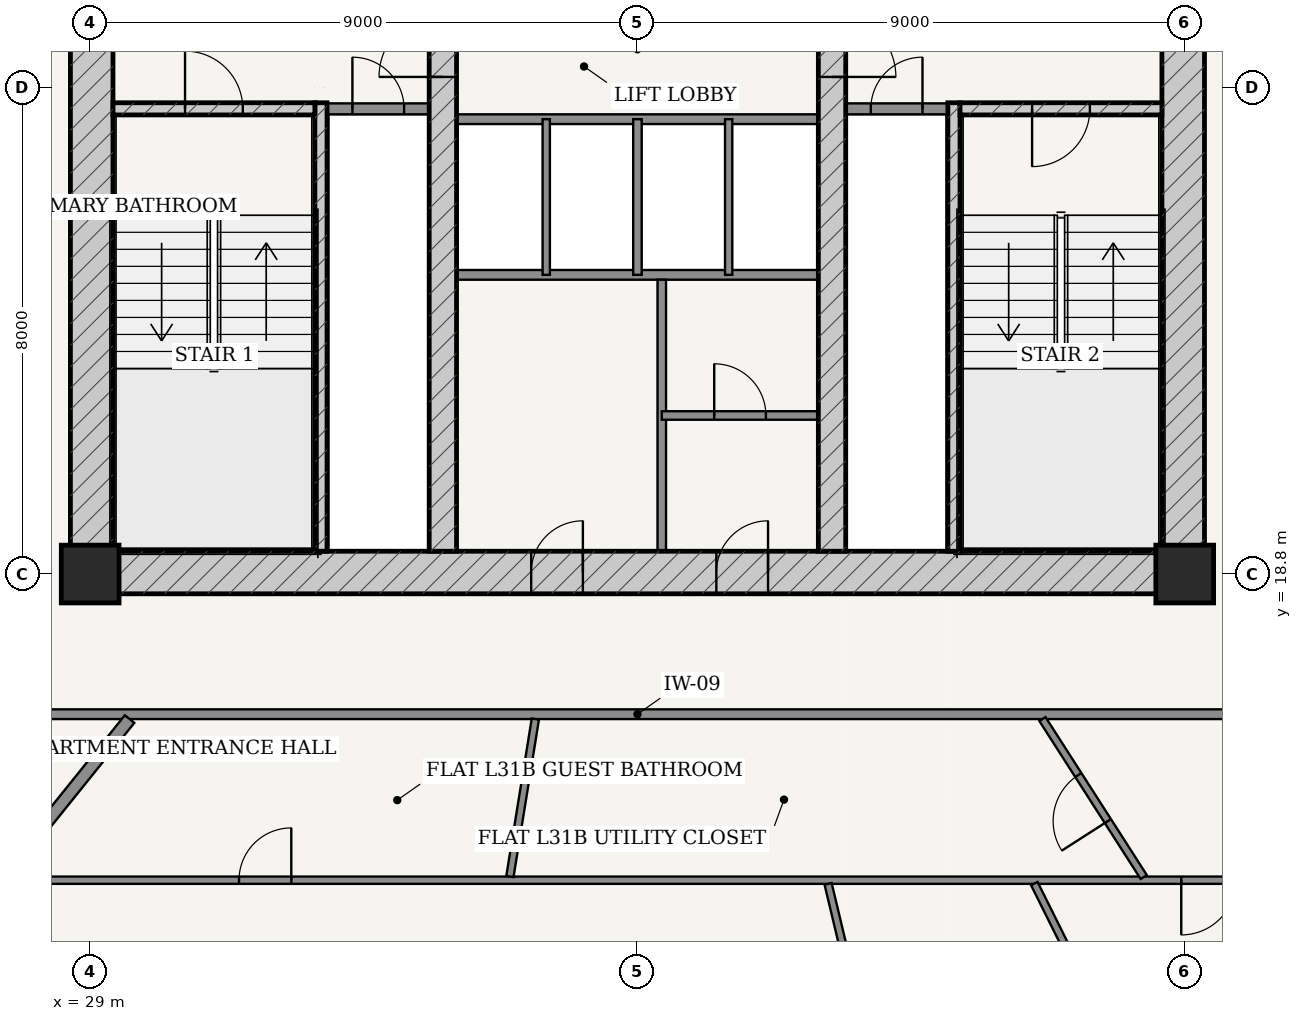
"""IFC4 building model, lengths in metres.
Left out: names, types, materials, properties, quantities, classifications, styles, units other than length and angle.
Written with IfcOpenShell. Run it as: python <this file> out.ifc"""

import sys

from ifc_helpers import new_model, si_unit, direction, frame, frame_2d, origin, origin_2d, place, context, subcontext, project, spatial, rectangle, extrude, source, transform, mapped, element, fill, save


model = new_model("IFC4")
c1 = context("Model", 3, precision=1e-05, world=origin(), true_north=direction((-0.2419218956, 0.970295726276)))
c2 = subcontext(c1, "Body", "Model", "MODEL_VIEW")
j1 = project(units=[si_unit("LENGTHUNIT", "METRE"), si_unit("PLANEANGLEUNIT", "RADIAN")], contexts=[c1])
p1 = place(None, origin())
s1 = spatial("IfcSite", under=j1, at=p1, CompositionType="ELEMENT")
p2 = place(p1, origin())
s2 = spatial("IfcBuilding", under=s1, at=p2, CompositionType="ELEMENT")
p3 = place(p2, frame((0.0, 0.0, 119.4)))
s3 = spatial("IfcBuildingStorey", under=s2, at=p3, CompositionType="ELEMENT", Elevation=119.4)
for number, where, z_axis, x_axis in (
    (1, (29.0, 18.8, 0.0), (0.0, 0.0, 1.0), (1.0, 0.0, 0.0)),
    (2, (47.0, 18.8, 0.0), (0.0, 0.0, 1.0), (1.0, 0.0, 0.0)),
):
    element("IfcColumn", number, at=place(p3, frame(where, z_axis=z_axis, x_axis=x_axis)), inside=s3, PredefinedType="COLUMN", context=c2, shape_type="SweptSolid", body=[
        extrude(rectangle(XDim=0.95, YDim=0.95, at=origin_2d()), origin(), (0.0, 0.0, 1.0), 3.6),
    ])
p4 = place(p3, frame((28.675, 18.825, 0.0), z_axis=(0.0, 0.0, 1.0), x_axis=(1.0, 0.0, 0.0)))
e3 = element("IfcWall", 3, at=p4, inside=s3, PredefinedType="SHEAR", context=c2, shape_type="SweptSolid", body=[
    extrude(rectangle(XDim=18.65, YDim=0.7, at=frame_2d((9.325, 0.0))), origin(), (0.0, 0.0, 1.0), 3.325),
])
p5 = place(p4, frame((7.577, 0.0, 0.0)))
e4 = element("IfcOpeningElement", 4, at=p5, cuts=e3, PredefinedType="OPENING", context=c2, shape_type="SweptSolid", body=[
    extrude(rectangle(XDim=0.85, YDim=2.1, at=frame_2d((0.425, 1.05))), frame((0.0, 0.36, 0.0), z_axis=(0.0, -1.0, 0.0), x_axis=(1.0, 0.0, 0.0)), (0.0, 0.0, 1.0), 0.72),
])
p6 = place(p4, frame((10.623, 0.0, 0.0)))
e5 = element("IfcOpeningElement", 5, at=p6, cuts=e3, PredefinedType="OPENING", context=c2, shape_type="SweptSolid", body=[
    extrude(rectangle(XDim=0.85, YDim=2.1, at=frame_2d((0.425, 1.05))), frame((0.0, 0.36, 0.0), z_axis=(0.0, -1.0, 0.0), x_axis=(1.0, 0.0, 0.0)), (0.0, 0.0, 1.0), 0.72),
])
p7 = place(p3, frame((29.025, 19.175, 0.0), z_axis=(0.0, 0.0, 1.0), x_axis=(0.0, 1.0, 0.0)))
e6 = element("IfcWall", 6, at=p7, inside=s3, PredefinedType="SHEAR", context=c2, shape_type="SweptSolid", body=[
    extrude(rectangle(XDim=15.25, YDim=0.7, at=frame_2d((7.625, 0.0))), origin(), (0.0, 0.0, 1.0), 3.325),
])
p8 = place(p7, frame((9.875, 0.0, 0.0)))
e7 = element("IfcOpeningElement", 7, at=p8, cuts=e6, PredefinedType="OPENING", context=c2, shape_type="SweptSolid", body=[
    extrude(rectangle(XDim=1.5, YDim=2.2, at=frame_2d((0.75, 1.1))), frame((0.0, 0.36, 0.0), z_axis=(0.0, -1.0, 0.0), x_axis=(1.0, 0.0, 0.0)), (0.0, 0.0, 1.0), 0.72),
])
p9 = place(p3, frame((46.975, 19.175, 0.0), z_axis=(0.0, 0.0, 1.0), x_axis=(0.0, 1.0, 0.0)))
e8 = element("IfcWall", 8, at=p9, inside=s3, PredefinedType="SHEAR", context=c2, shape_type="SweptSolid", body=[
    extrude(rectangle(XDim=15.25, YDim=0.7, at=frame_2d((7.625, 0.0))), origin(), (0.0, 0.0, 1.0), 3.325),
])
p10 = place(p9, frame((9.875, 0.0, 0.0)))
e9 = element("IfcOpeningElement", 9, at=p10, cuts=e8, PredefinedType="OPENING", context=c2, shape_type="SweptSolid", body=[
    extrude(rectangle(XDim=1.5, YDim=2.2, at=frame_2d((0.75, 1.1))), frame((0.0, 0.36, 0.0), z_axis=(0.0, -1.0, 0.0), x_axis=(1.0, 0.0, 0.0)), (0.0, 0.0, 1.0), 0.72),
])
p11 = place(p3, frame((32.795, 19.175, 0.0), z_axis=(0.0, 0.0, 1.0), x_axis=(0.0, 1.0, 0.0)))
e10 = element("IfcWall", 10, at=p11, inside=s3, PredefinedType="SOLIDWALL", context=c2, shape_type="SweptSolid", body=[
    extrude(rectangle(XDim=7.375, YDim=0.2, at=frame_2d((3.688, 0.0))), origin(), (0.0, 0.0, 1.0), 3.325),
])
p12 = place(p3, frame((29.375, 26.45, 0.0), z_axis=(0.0, 0.0, 1.0), x_axis=(1.0, 0.0, 0.0)))
e11 = element("IfcWall", 11, at=p12, inside=s3, PredefinedType="SOLIDWALL", context=c2, shape_type="SweptSolid", body=[
    extrude(rectangle(XDim=3.32, YDim=0.2, at=frame_2d((1.66, 0.0))), origin(), (0.0, 0.0, 1.0), 3.325),
])
p13 = place(p12, frame((1.185, 0.0, 0.0)))
e12 = element("IfcOpeningElement", 12, at=p13, cuts=e11, PredefinedType="OPENING", context=c2, shape_type="SweptSolid", body=[
    extrude(rectangle(XDim=0.95, YDim=2.15, at=frame_2d((0.475, 1.075))), frame((0.0, 0.11, 0.0), z_axis=(0.0, -1.0, 0.0), x_axis=(1.0, 0.0, 0.0)), (0.0, 0.0, 1.0), 0.22),
])
p14 = place(p3, frame((43.205, 19.175, 0.0), z_axis=(0.0, 0.0, 1.0), x_axis=(0.0, 1.0, 0.0)))
e13 = element("IfcWall", 13, at=p14, inside=s3, PredefinedType="SOLIDWALL", context=c2, shape_type="SweptSolid", body=[
    extrude(rectangle(XDim=7.375, YDim=0.2, at=frame_2d((3.688, 0.0))), origin(), (0.0, 0.0, 1.0), 3.325),
])
p15 = place(p3, frame((43.305, 26.45, 0.0), z_axis=(0.0, 0.0, 1.0), x_axis=(1.0, 0.0, 0.0)))
e14 = element("IfcWall", 14, at=p15, inside=s3, PredefinedType="SOLIDWALL", context=c2, shape_type="SweptSolid", body=[
    extrude(rectangle(XDim=3.32, YDim=0.2, at=frame_2d((1.66, 0.0))), origin(), (0.0, 0.0, 1.0), 3.325),
])
p16 = place(p15, frame((1.185, 0.0, 0.0)))
e15 = element("IfcOpeningElement", 15, at=p16, cuts=e14, PredefinedType="OPENING", context=c2, shape_type="SweptSolid", body=[
    extrude(rectangle(XDim=0.95, YDim=2.15, at=frame_2d((0.475, 1.075))), frame((0.0, 0.11, 0.0), z_axis=(0.0, -1.0, 0.0), x_axis=(1.0, 0.0, 0.0)), (0.0, 0.0, 1.0), 0.22),
])
p17 = place(p3, frame((34.8, 19.175, 0.0), z_axis=(0.0, 0.0, 1.0), x_axis=(0.0, 1.0, 0.0)))
e16 = element("IfcWall", 16, at=p17, inside=s3, PredefinedType="SHEAR", context=c2, shape_type="SweptSolid", body=[
    extrude(rectangle(XDim=15.25, YDim=0.45, at=frame_2d((7.625, 0.0))), origin(), (0.0, 0.0, 1.0), 3.325),
])
p18 = place(p17, frame((7.8, 0.0, 0.0)))
e17 = element("IfcOpeningElement", 17, at=p18, cuts=e16, PredefinedType="OPENING", context=c2, shape_type="SweptSolid", body=[
    extrude(rectangle(XDim=1.05, YDim=2.15, at=frame_2d((0.525, 1.075))), frame((0.0, 0.235, 0.0), z_axis=(0.0, -1.0, 0.0), x_axis=(1.0, 0.0, 0.0)), (0.0, 0.0, 1.0), 0.47),
])
p19 = place(p3, frame((41.2, 19.175, 0.0), z_axis=(0.0, 0.0, 1.0), x_axis=(0.0, 1.0, 0.0)))
e18 = element("IfcWall", 18, at=p19, inside=s3, PredefinedType="SHEAR", context=c2, shape_type="SweptSolid", body=[
    extrude(rectangle(XDim=15.25, YDim=0.45, at=frame_2d((7.625, 0.0))), origin(), (0.0, 0.0, 1.0), 3.325),
])
p20 = place(p19, frame((7.8, 0.0, 0.0)))
e19 = element("IfcOpeningElement", 19, at=p20, cuts=e18, PredefinedType="OPENING", context=c2, shape_type="SweptSolid", body=[
    extrude(rectangle(XDim=1.05, YDim=2.15, at=frame_2d((0.525, 1.075))), frame((0.0, 0.235, 0.0), z_axis=(0.0, -1.0, 0.0), x_axis=(1.0, 0.0, 0.0)), (0.0, 0.0, 1.0), 0.47),
])
p21 = place(p3, frame((32.9, 26.45, 0.0), z_axis=(0.0, 0.0, 1.0), x_axis=(1.0, 0.0, 0.0)))
e20 = element("IfcWall", 20, at=p21, inside=s3, PredefinedType="PARTITIONING", context=c2, shape_type="SweptSolid", body=[
    extrude(rectangle(XDim=1.675, YDim=0.18, at=frame_2d((0.837, 0.0))), origin(), (0.0, 0.0, 1.0), 3.325),
])
p22 = place(p21, frame((0.413, 0.0, 0.0)))
e21 = element("IfcOpeningElement", 21, at=p22, cuts=e20, PredefinedType="OPENING", context=c2, shape_type="SweptSolid", body=[
    extrude(rectangle(XDim=0.85, YDim=2.1, at=frame_2d((0.425, 1.05))), frame((0.0, 0.1, 0.0), z_axis=(0.0, -1.0, 0.0), x_axis=(1.0, 0.0, 0.0)), (0.0, 0.0, 1.0), 0.2),
])
p23 = place(p3, frame((41.425, 26.45, 0.0), z_axis=(0.0, 0.0, 1.0), x_axis=(1.0, 0.0, 0.0)))
e22 = element("IfcWall", 22, at=p23, inside=s3, PredefinedType="PARTITIONING", context=c2, shape_type="SweptSolid", body=[
    extrude(rectangle(XDim=1.675, YDim=0.18, at=frame_2d((0.837, 0.0))), origin(), (0.0, 0.0, 1.0), 3.325),
])
p24 = place(p23, frame((0.413, 0.0, 0.0)))
e23 = element("IfcOpeningElement", 23, at=p24, cuts=e22, PredefinedType="OPENING", context=c2, shape_type="SweptSolid", body=[
    extrude(rectangle(XDim=0.85, YDim=2.1, at=frame_2d((0.425, 1.05))), frame((0.0, 0.1, 0.0), z_axis=(0.0, -1.0, 0.0), x_axis=(1.0, 0.0, 0.0)), (0.0, 0.0, 1.0), 0.2),
])
for number, where, z_axis, x_axis in (
    (24, (35.025, 26.28, 0.0), (0.0, 0.0, 1.0), (1.0, 0.0, 0.0)),
    (25, (35.025, 23.72, 0.0), (0.0, 0.0, 1.0), (1.0, 0.0, 0.0)),
):
    element("IfcWall", number, at=place(p3, frame(where, z_axis=z_axis, x_axis=x_axis)), inside=s3, PredefinedType="PARTITIONING", context=c2, shape_type="SweptSolid", body=[
        extrude(rectangle(XDim=5.95, YDim=0.16, at=frame_2d((2.975, 0.0))), origin(), (0.0, 0.0, 1.0), 3.325),
    ])
p25 = place(p3, frame((36.5, 23.72, 0.0), z_axis=(0.0, 0.0, 1.0), x_axis=(0.0, 1.0, 0.0)))
e26 = element("IfcWall", 26, at=p25, inside=s3, PredefinedType="PARTITIONING", context=c2, shape_type="SweptSolid", body=[
    extrude(rectangle(XDim=2.56, YDim=0.12, at=frame_2d((1.28, 0.0))), origin(), (0.0, 0.0, 1.0), 3.325),
])
p26 = place(p3, frame((38.0, 23.72, 0.0), z_axis=(0.0, 0.0, 1.0), x_axis=(0.0, 1.0, 0.0)))
e27 = element("IfcWall", 27, at=p26, inside=s3, PredefinedType="PARTITIONING", context=c2, shape_type="SweptSolid", body=[
    extrude(rectangle(XDim=2.56, YDim=0.14, at=frame_2d((1.28, 0.0))), origin(), (0.0, 0.0, 1.0), 3.325),
])
p27 = place(p3, frame((39.5, 23.72, 0.0), z_axis=(0.0, 0.0, 1.0), x_axis=(0.0, 1.0, 0.0)))
e28 = element("IfcWall", 28, at=p27, inside=s3, PredefinedType="PARTITIONING", context=c2, shape_type="SweptSolid", body=[
    extrude(rectangle(XDim=2.56, YDim=0.12, at=frame_2d((1.28, 0.0))), origin(), (0.0, 0.0, 1.0), 3.325),
])
p28 = place(p3, frame((38.4, 19.175, 0.0), z_axis=(0.0, 0.0, 1.0), x_axis=(0.0, 1.0, 0.0)))
e29 = element("IfcWall", 29, at=p28, inside=s3, PredefinedType="PARTITIONING", context=c2, shape_type="SweptSolid", body=[
    extrude(rectangle(XDim=4.465, YDim=0.14, at=frame_2d((2.232, 0.0))), origin(), (0.0, 0.0, 1.0), 3.325),
])
p29 = place(p3, frame((38.4, 21.407, 0.0), z_axis=(0.0, 0.0, 1.0), x_axis=(1.0, 0.0, 0.0)))
e30 = element("IfcWall", 30, at=p29, inside=s3, PredefinedType="PARTITIONING", context=c2, shape_type="SweptSolid", body=[
    extrude(rectangle(XDim=2.575, YDim=0.14, at=frame_2d((1.288, 0.0))), origin(), (0.0, 0.0, 1.0), 3.325),
])
p30 = place(p29, frame((0.863, 0.0, 0.0)))
e31 = element("IfcOpeningElement", 31, at=p30, cuts=e30, PredefinedType="OPENING", context=c2, shape_type="SweptSolid", body=[
    extrude(rectangle(XDim=0.85, YDim=2.1, at=frame_2d((0.425, 1.05))), frame((0.0, 0.08, 0.0), z_axis=(0.0, -1.0, 0.0), x_axis=(1.0, 0.0, 0.0)), (0.0, 0.0, 1.0), 0.16),
])
p31 = place(p3, frame((26.695, 16.495, 0.0), z_axis=(0.0, 0.0, 1.0), x_axis=(1.0, 0.0, 0.0)))
e32 = element("IfcWall", 32, at=p31, inside=s3, PredefinedType="PARTITIONING", context=c2, shape_type="SweptSolid", body=[
    extrude(rectangle(XDim=22.61, YDim=0.16, at=frame_2d((11.305, 0.0))), origin(), (0.0, 0.0, 1.0), 2.767),
])
p32 = place(p3, frame((29.648, 16.415, 0.0), z_axis=(0.0, 0.0, 1.0), x_axis=(-0.626701127389, -0.779259710834, 0.0)))
e33 = element("IfcWall", 33, at=p32, inside=s3, PredefinedType="PARTITIONING", context=c2, shape_type="SweptSolid", body=[
    extrude(rectangle(XDim=10.141, YDim=0.2, at=frame_2d((5.071, 0.0))), origin(), (0.0, 0.0, 1.0), 2.767),
])
p33 = place(p3, frame((52.035, 13.765, 0.0), z_axis=(0.0, 0.0, 1.0), x_axis=(-1.0, 0.0, 0.0)))
e34 = element("IfcWall", 34, at=p33, inside=s3, PredefinedType="PARTITIONING", context=c2, shape_type="SweptSolid", body=[
    extrude(rectangle(XDim=24.416, YDim=0.12, at=frame_2d((12.208, 0.0))), origin(), (0.0, 0.0, 1.0), 2.767),
])
p34 = place(p33, frame((4.192, 0.0, 0.0)))
e35 = element("IfcOpeningElement", 35, at=p34, cuts=e34, PredefinedType="OPENING", context=c2, shape_type="SweptSolid", body=[
    extrude(rectangle(XDim=0.9, YDim=2.15, at=frame_2d((0.45, 1.075))), frame((0.0, 0.07, 0.0), z_axis=(0.0, -1.0, 0.0), x_axis=(1.0, 0.0, 0.0)), (0.0, 0.0, 1.0), 0.14),
])
p35 = place(p33, frame((19.728, 0.0, 0.0)))
e36 = element("IfcOpeningElement", 36, at=p35, cuts=e34, PredefinedType="OPENING", context=c2, shape_type="SweptSolid", body=[
    extrude(rectangle(XDim=0.86, YDim=2.15, at=frame_2d((0.43, 1.075))), frame((0.0, 0.07, 0.0), z_axis=(0.0, -1.0, 0.0), x_axis=(1.0, 0.0, 0.0)), (0.0, 0.0, 1.0), 0.14),
])
p36 = place(p3, frame((41.135, 13.705, 0.0), z_axis=(0.0, 0.0, 1.0), x_axis=(0.23282725047, -0.97251810854, 0.0)))
e37 = element("IfcWall", 37, at=p36, inside=s3, PredefinedType="PARTITIONING", context=c2, shape_type="SweptSolid", body=[
    extrude(rectangle(XDim=8.715, YDim=0.12, at=frame_2d((4.357, 0.0))), origin(), (0.0, 0.0, 1.0), 2.767),
])
p37 = place(p36, frame((2.831, 0.0, 0.0)))
e38 = element("IfcOpeningElement", 38, at=p37, cuts=e37, PredefinedType="OPENING", context=c2, shape_type="SweptSolid", body=[
    extrude(rectangle(XDim=0.9, YDim=2.15, at=frame_2d((0.45, 1.075))), frame((0.0, 0.07, 0.0), z_axis=(0.0, -1.0, 0.0), x_axis=(1.0, 0.0, 0.0)), (0.0, 0.0, 1.0), 0.14),
])
p38 = place(p3, frame((44.526, 13.709, 0.0), z_axis=(0.0, 0.0, 1.0), x_axis=(0.446179583353, -0.894943450392, 0.0)))
e39 = element("IfcWall", 39, at=p38, inside=s3, PredefinedType="PARTITIONING", context=c2, shape_type="SweptSolid", body=[
    extrude(rectangle(XDim=8.125, YDim=0.12, at=frame_2d((4.062, 0.0))), origin(), (0.0, 0.0, 1.0), 2.767),
])
p39 = place(p38, frame((3.612, 0.0, 0.0)))
e40 = element("IfcOpeningElement", 40, at=p39, cuts=e39, PredefinedType="OPENING", context=c2, shape_type="SweptSolid", body=[
    extrude(rectangle(XDim=0.9, YDim=2.15, at=frame_2d((0.45, 1.075))), frame((0.0, 0.07, 0.0), z_axis=(0.0, -1.0, 0.0), x_axis=(1.0, 0.0, 0.0)), (0.0, 0.0, 1.0), 0.14),
])
p40 = place(p3, frame((36.321, 16.415, 0.0), z_axis=(0.0, 0.0, 1.0), x_axis=(-0.159566101486, -0.9871872463, 0.0)))
e41 = element("IfcWall", 41, at=p40, inside=s3, PredefinedType="PARTITIONING", context=c2, shape_type="SweptSolid", body=[
    extrude(rectangle(XDim=2.623, YDim=0.12, at=frame_2d((1.311, 0.0))), origin(), (0.0, 0.0, 1.0), 3.325),
])
p41 = place(p3, frame((44.66, 16.415, 0.0), z_axis=(0.0, 0.0, 1.0), x_axis=(0.539825682796, -0.841776830397, 0.0)))
e42 = element("IfcWall", 42, at=p41, inside=s3, PredefinedType="PARTITIONING", context=c2, shape_type="SweptSolid", body=[
    extrude(rectangle(XDim=3.086, YDim=0.12, at=frame_2d((1.543, 0.0))), origin(), (0.0, 0.0, 1.0), 3.325),
])
p42 = place(p41, frame((1.093, 0.0, 0.0)))
e43 = element("IfcOpeningElement", 43, at=p42, cuts=e42, PredefinedType="OPENING", context=c2, shape_type="SweptSolid", body=[
    extrude(rectangle(XDim=0.9, YDim=2.15, at=frame_2d((0.45, 1.075))), frame((0.0, 0.07, 0.0), z_axis=(0.0, -1.0, 0.0), x_axis=(1.0, 0.0, 0.0)), (0.0, 0.0, 1.0), 0.14),
])
m1 = source(origin(), c2, "Body", "SweptSolid", [
    extrude(rectangle(XDim=1.05, YDim=2.15, at=frame_2d((0.525, 1.075))), frame((0.0, 0.025, 0.0), z_axis=(0.0, -1.0, 0.0), x_axis=(1.0, 0.0, 0.0)), (0.0, 0.0, 1.0), 0.05),
])
p43 = place(p18, origin())
e44 = element("IfcDoor", 44, at=p43, inside=s3, OperationType="SINGLE_SWING_LEFT", PredefinedType="DOOR", context=c2, shape_type="MappedRepresentation", body=[
    mapped(m1, transform((0.0, 0.0, 0.0), scale=1.0)),
])
fill(e17, e44)
p44 = place(p20, frame((1.05, 0.0, 0.0), z_axis=(0.0, 0.0, 1.0), x_axis=(-1.0, 0.0, 0.0)))
e45 = element("IfcDoor", 45, at=p44, inside=s3, OperationType="SINGLE_SWING_RIGHT", PredefinedType="DOOR", context=c2, shape_type="MappedRepresentation", body=[
    mapped(m1, transform((0.0, 0.0, 0.0), scale=1.0)),
])
fill(e19, e45)
m2 = source(origin(), c2, "Body", "SweptSolid", [
    extrude(rectangle(XDim=0.95, YDim=2.15, at=frame_2d((0.475, 1.075))), frame((0.0, 0.025, 0.0), z_axis=(0.0, -1.0, 0.0), x_axis=(1.0, 0.0, 0.0)), (0.0, 0.0, 1.0), 0.05),
])
p45 = place(p13, origin())
e46 = element("IfcDoor", 46, at=p45, inside=s3, OperationType="SINGLE_SWING_LEFT", PredefinedType="DOOR", context=c2, shape_type="MappedRepresentation", body=[
    mapped(m2, transform((0.0, 0.0, 0.0), scale=1.0)),
])
fill(e12, e46)
p46 = place(p16, frame((0.95, 0.0, 0.0), z_axis=(0.0, 0.0, 1.0), x_axis=(-1.0, 0.0, 0.0)))
e47 = element("IfcDoor", 47, at=p46, inside=s3, OperationType="SINGLE_SWING_RIGHT", PredefinedType="DOOR", context=c2, shape_type="MappedRepresentation", body=[
    mapped(m2, transform((0.0, 0.0, 0.0), scale=1.0)),
])
fill(e15, e47)
m3 = source(origin(), c2, "Body", "SweptSolid", [
    extrude(rectangle(XDim=0.85, YDim=2.1, at=frame_2d((0.425, 1.05))), frame((0.0, 0.025, 0.0), z_axis=(0.0, -1.0, 0.0), x_axis=(1.0, 0.0, 0.0)), (0.0, 0.0, 1.0), 0.05),
])
p47 = place(p22, origin())
e48 = element("IfcDoor", 48, at=p47, inside=s3, OperationType="SINGLE_SWING_LEFT", PredefinedType="DOOR", context=c2, shape_type="MappedRepresentation", body=[
    mapped(m3, transform((0.0, 0.0, 0.0), scale=1.0)),
])
fill(e21, e48)
p48 = place(p24, origin())
e49 = element("IfcDoor", 49, at=p48, inside=s3, OperationType="SINGLE_SWING_RIGHT", PredefinedType="DOOR", context=c2, shape_type="MappedRepresentation", body=[
    mapped(m3, transform((0.0, 0.0, 0.0), scale=1.0)),
])
fill(e23, e49)
p49 = place(p5, origin())
e50 = element("IfcDoor", 50, at=p49, inside=s3, OperationType="SINGLE_SWING_RIGHT", PredefinedType="DOOR", context=c2, shape_type="MappedRepresentation", body=[
    mapped(m3, transform((0.0, 0.0, 0.0), scale=1.0)),
])
fill(e4, e50)
p50 = place(p6, origin())
e51 = element("IfcDoor", 51, at=p50, inside=s3, OperationType="SINGLE_SWING_RIGHT", PredefinedType="DOOR", context=c2, shape_type="MappedRepresentation", body=[
    mapped(m3, transform((0.0, 0.0, 0.0), scale=1.0)),
])
fill(e5, e51)
p51 = place(p30, origin())
e52 = element("IfcDoor", 52, at=p51, inside=s3, OperationType="SINGLE_SWING_LEFT", PredefinedType="DOOR", context=c2, shape_type="MappedRepresentation", body=[
    mapped(m3, transform((0.0, 0.0, 0.0), scale=1.0)),
])
fill(e31, e52)
m4 = source(origin(), c2, "Body", "SweptSolid", [
    extrude(rectangle(XDim=0.9, YDim=2.15, at=frame_2d((0.45, 1.075))), frame((0.0, 0.025, 0.0), z_axis=(0.0, -1.0, 0.0), x_axis=(1.0, 0.0, 0.0)), (0.0, 0.0, 1.0), 0.05),
])
p52 = place(p34, origin())
e53 = element("IfcDoor", 53, at=p52, inside=s3, OperationType="SINGLE_SWING_RIGHT", PredefinedType="DOOR", context=c2, shape_type="MappedRepresentation", body=[
    mapped(m4, transform((0.0, 0.0, 0.0), scale=1.0)),
])
fill(e35, e53)
p53 = place(p42, frame((0.9, 0.0, 0.0), z_axis=(0.0, 0.0, 1.0), x_axis=(-1.0, 0.0, 0.0)))
e54 = element("IfcDoor", 54, at=p53, inside=s3, OperationType="SINGLE_SWING_LEFT", PredefinedType="DOOR", context=c2, shape_type="MappedRepresentation", body=[
    mapped(m4, transform((0.0, 0.0, 0.0), scale=1.0)),
])
fill(e43, e54)
m5 = source(origin(), c2, "Body", "SweptSolid", [
    extrude(rectangle(XDim=0.86, YDim=2.15, at=frame_2d((0.43, 1.075))), frame((0.0, 0.025, 0.0), z_axis=(0.0, -1.0, 0.0), x_axis=(1.0, 0.0, 0.0)), (0.0, 0.0, 1.0), 0.05),
])
p54 = place(p35, frame((0.86, 0.0, 0.0), z_axis=(0.0, 0.0, 1.0), x_axis=(-1.0, 0.0, 0.0)))
e55 = element("IfcDoor", 55, at=p54, inside=s3, OperationType="SINGLE_SWING_RIGHT", PredefinedType="DOOR", context=c2, shape_type="MappedRepresentation", body=[
    mapped(m5, transform((0.0, 0.0, 0.0), scale=1.0)),
])
fill(e36, e55)
save(model, sys.argv[1])
